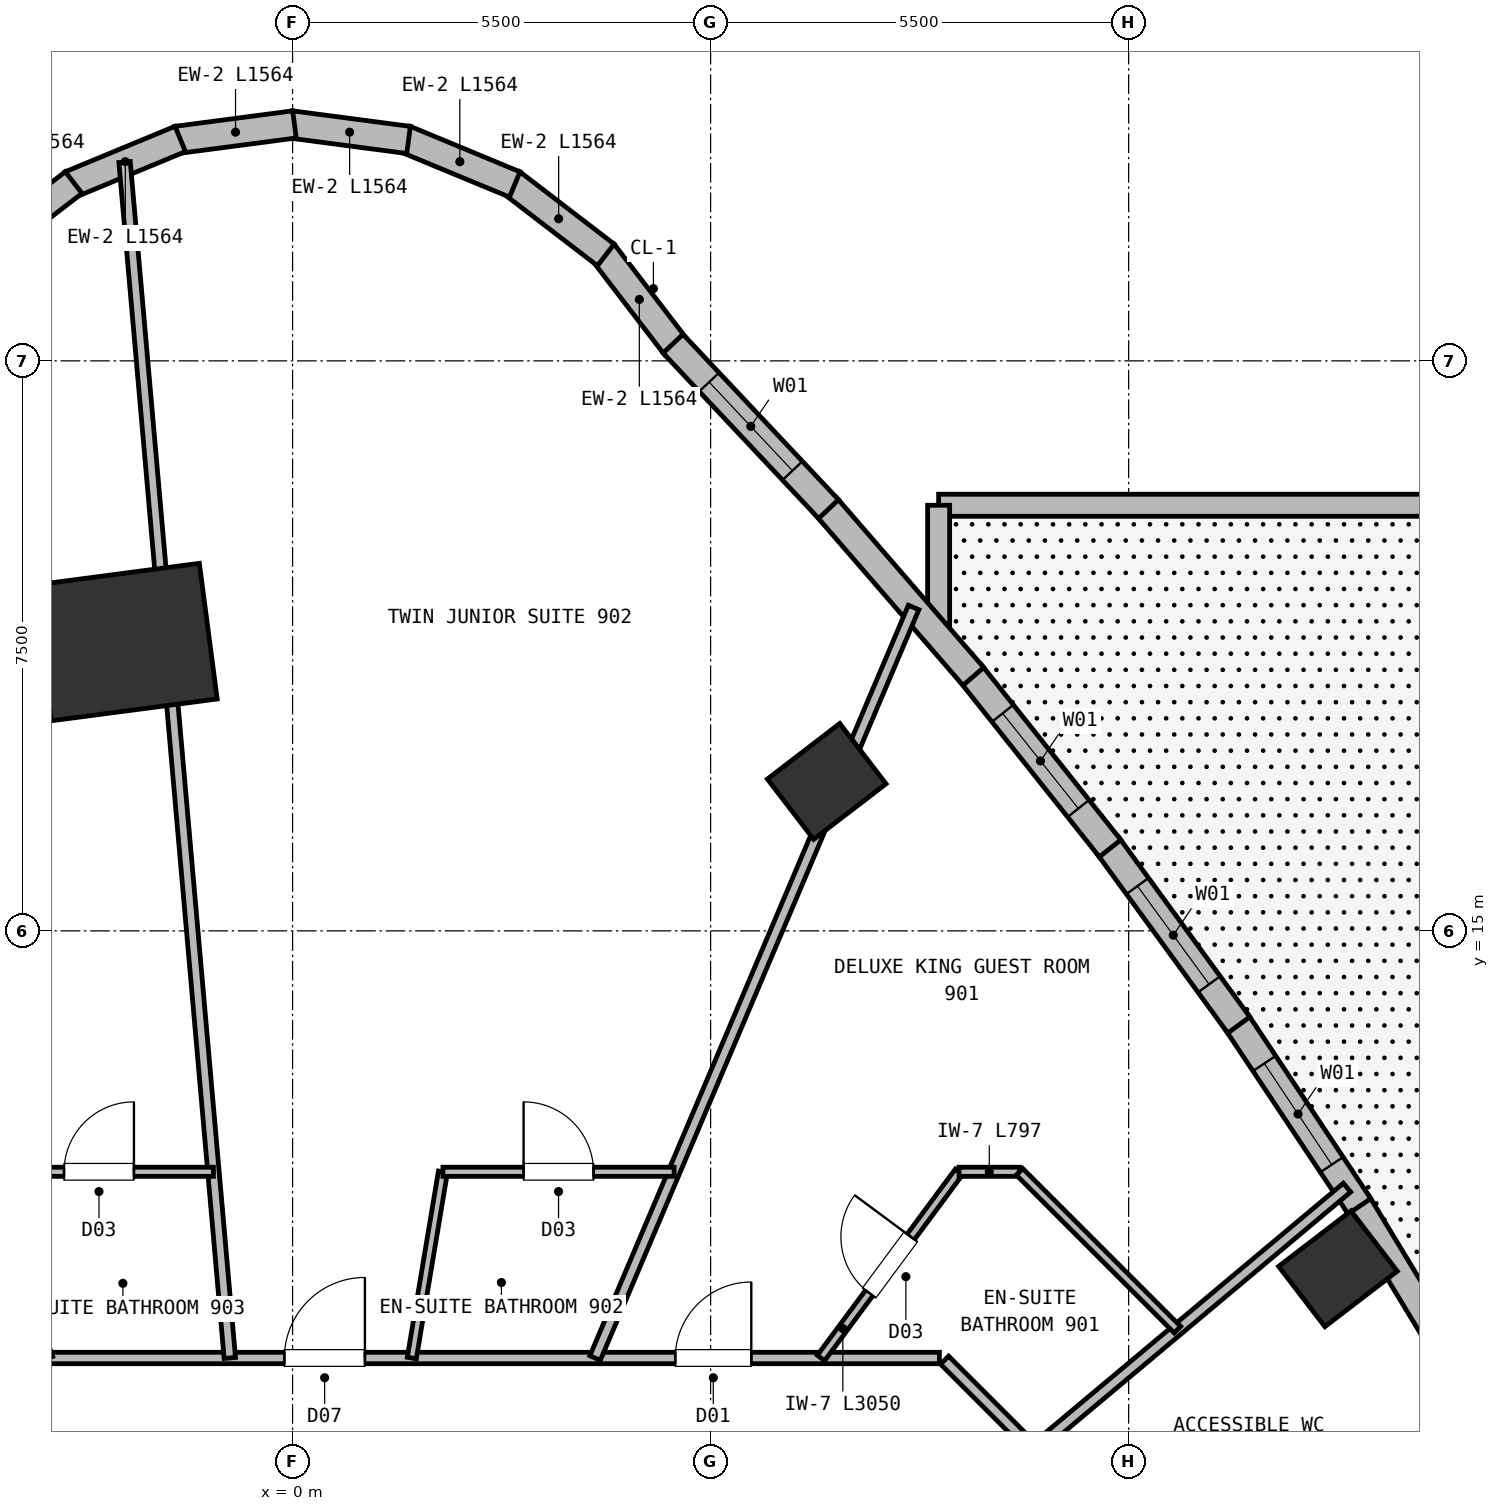
"""IFC4 building model, lengths in metres.
Left out: names, types, materials, properties, quantities, classifications, styles, units other than length and angle.
Written with IfcOpenShell. Run it as: python <this file> out.ifc"""

import sys

from ifc_helpers import new_model, si_unit, direction, frame, frame_2d, origin, origin_2d, place, context, subcontext, project, spatial, rectangle, extrude, element, fill, save


model = new_model("IFC4")
c1 = context("Model", 3, precision=1e-05, world=origin(), true_north=direction((0.0, 1.0)))
c2 = subcontext(c1, "Body", "Model", "MODEL_VIEW")
j1 = project(units=[si_unit("LENGTHUNIT", "METRE"), si_unit("PLANEANGLEUNIT", "RADIAN")], contexts=[c1])
p1 = place(None, origin())
s1 = spatial("IfcSite", under=j1, at=p1, CompositionType="ELEMENT")
p2 = place(p1, origin())
s2 = spatial("IfcBuilding", under=s1, at=p2, CompositionType="ELEMENT")
p3 = place(p2, frame((0.0, 0.0, 30.5)))
s3 = spatial("IfcBuildingStorey", under=s2, at=p3, CompositionType="ELEMENT", Elevation=30.5)
p4 = place(p3, frame((-2.2, 18.8, 0.0), z_axis=(0.0, 0.0, 1.0), x_axis=(-0.13052619222, 0.991444861374, 0.0)))
e1 = element("IfcColumn", 1, at=p4, inside=s3, PredefinedType="COLUMN", context=c2, shape_type="SweptSolid", body=[
    extrude(rectangle(XDim=1.8, YDim=2.2, at=origin_2d()), origin(), (0.0, 0.0, 1.0), 3.75),
])
for number, where, z_axis, x_axis in (
    (2, (13.754, 10.554, 0.0), (0.0, 0.0, 1.0), (-0.609, 0.793, 0.0)),
    (3, (7.028, 16.966, 0.0), (0.0, 0.0, 1.0), (-0.609, 0.793, 0.0)),
):
    element("IfcColumn", number, at=place(p3, frame(where, z_axis=z_axis, x_axis=x_axis)), inside=s3, PredefinedType="COLUMN", context=c2, shape_type="SweptSolid", body=[
        extrude(rectangle(XDim=1.0, YDim=1.2, at=origin_2d()), origin(), (0.0, 0.0, 1.0), 3.75),
    ])
p5 = place(p3, frame((34.5, 20.6, 0.0), z_axis=(0.0, 0.0, 1.0), x_axis=(-1.0, 0.0, 0.0)))
e4 = element("IfcWall", 4, at=p5, inside=s3, PredefinedType="PARAPET", context=c2, shape_type="SweptSolid", body=[
    extrude(rectangle(XDim=26.0, YDim=0.29, at=frame_2d((13.0, 0.0))), origin(), (0.0, 0.0, 1.0), 1.2),
])
p6 = place(p3, frame((8.5, 20.6, 0.0), z_axis=(0.0, 0.0, 1.0), x_axis=(0.0, -1.0, 0.0)))
e5 = element("IfcWall", 5, at=p6, inside=s3, PredefinedType="PARAPET", context=c2, shape_type="SweptSolid", body=[
    extrude(rectangle(XDim=1.694, YDim=0.29, at=frame_2d((0.847, 0.0))), origin(), (0.0, 0.0, 1.0), 1.2),
])
for number, where, z_axis, x_axis in (
    (6, (4.086, 23.929, 0.0), (0.0, 0.0, 1.0), (0.609, -0.793, 0.0)),
    (7, (2.88, 24.846, 0.0), (0.0, 0.0, 1.0), (0.793, -0.609, 0.0)),
    (8, (1.478, 25.42, 0.0), (0.0, 0.0, 1.0), (0.924, -0.383, 0.0)),
    (9, (-0.025, 25.611, 0.0), (0.0, 0.0, 1.0), (0.991, -0.13, 0.0)),
    (10, (-1.526, 25.407, 0.0), (0.0, 0.0, 1.0), (0.991, 0.13, 0.0)),
    (11, (-2.923, 24.821, 0.0), (0.0, 0.0, 1.0), (0.924, 0.383, 0.0)),
    (12, (-4.121, 23.894, 0.0), (0.0, 0.0, 1.0), (0.793, 0.609, 0.0)),
):
    element("IfcWall", number, at=place(p3, frame(where, z_axis=z_axis, x_axis=x_axis)), inside=s3, PredefinedType="SOLIDWALL", context=c2, shape_type="SweptSolid", body=[
        extrude(rectangle(XDim=1.564, YDim=0.36, at=frame_2d((0.782, 0.0))), origin(), (0.0, 0.0, 1.0), 3.5),
    ])
p7 = place(p3, frame((14.01, 11.419, 0.0), z_axis=(0.0, 0.0, 1.0), x_axis=(0.518463491903, -0.855099764685, 0.0)))
e13 = element("IfcWall", 13, at=p7, inside=s3, PredefinedType="SOLIDWALL", context=c2, shape_type="SweptSolid", body=[
    extrude(rectangle(XDim=2.91, YDim=0.36, at=frame_2d((1.455, 0.0))), origin(), (0.0, 0.0, 1.0), 3.5),
])
p8 = place(p3, frame((12.421, 13.802, 0.0), z_axis=(0.0, 0.0, 1.0), x_axis=(0.554410222631, -0.832243537099, 0.0)))
e14 = element("IfcWall", 14, at=p8, inside=s3, PredefinedType="SOLIDWALL", context=c2, shape_type="SweptSolid", body=[
    extrude(rectangle(XDim=2.915, YDim=0.36, at=frame_2d((1.458, 0.0))), origin(), (0.0, 0.0, 1.0), 3.5),
])
p9 = place(p8, frame((0.657, 0.0, 0.72)))
e15 = element("IfcOpeningElement", 15, at=p9, cuts=e14, PredefinedType="OPENING", context=c2, shape_type="SweptSolid", body=[
    extrude(rectangle(XDim=1.6, YDim=1.88, at=frame_2d((0.8, 0.94))), frame((0.0, 0.19, 0.0), z_axis=(0.0, -1.0, 0.0), x_axis=(1.0, 0.0, 0.0)), (0.0, 0.0, 1.0), 0.38),
])
p10 = place(p3, frame((10.726, 16.125, 0.0), z_axis=(0.0, 0.0, 1.0), x_axis=(0.589223239374, -0.807970280507, 0.0)))
e16 = element("IfcWall", 16, at=p10, inside=s3, PredefinedType="SOLIDWALL", context=c2, shape_type="SweptSolid", body=[
    extrude(rectangle(XDim=2.925, YDim=0.36, at=frame_2d((1.463, 0.0))), origin(), (0.0, 0.0, 1.0), 3.5),
])
p11 = place(p10, frame((0.663, 0.0, 0.72)))
e17 = element("IfcOpeningElement", 17, at=p11, cuts=e16, PredefinedType="OPENING", context=c2, shape_type="SweptSolid", body=[
    extrude(rectangle(XDim=1.6, YDim=1.88, at=frame_2d((0.8, 0.94))), frame((0.0, 0.19, 0.0), z_axis=(0.0, -1.0, 0.0), x_axis=(1.0, 0.0, 0.0)), (0.0, 0.0, 1.0), 0.38),
])
p12 = place(p3, frame((8.925, 18.387, 0.0), z_axis=(0.0, 0.0, 1.0), x_axis=(0.622637946995, -0.782510055502, 0.0)))
e18 = element("IfcWall", 18, at=p12, inside=s3, PredefinedType="SOLIDWALL", context=c2, shape_type="SweptSolid", body=[
    extrude(rectangle(XDim=2.941, YDim=0.36, at=frame_2d((1.471, 0.0))), origin(), (0.0, 0.0, 1.0), 3.5),
])
p13 = place(p12, frame((0.67, 0.0, 0.72)))
e19 = element("IfcOpeningElement", 19, at=p13, cuts=e18, PredefinedType="OPENING", context=c2, shape_type="SweptSolid", body=[
    extrude(rectangle(XDim=1.6, YDim=1.88, at=frame_2d((0.8, 0.94))), frame((0.0, 0.19, 0.0), z_axis=(0.0, -1.0, 0.0), x_axis=(1.0, 0.0, 0.0)), (0.0, 0.0, 1.0), 0.38),
])
p14 = place(p3, frame((7.018, 20.587, 0.0), z_axis=(0.0, 0.0, 1.0), x_axis=(0.654585220283, -0.755988220402, 0.0)))
e20 = element("IfcWall", 20, at=p14, inside=s3, PredefinedType="SOLIDWALL", context=c2, shape_type="SweptSolid", body=[
    extrude(rectangle(XDim=2.961, YDim=0.36, at=frame_2d((1.481, 0.0))), origin(), (0.0, 0.0, 1.0), 3.5),
])
p15 = place(p3, frame((5.006, 22.726, 0.0), z_axis=(0.0, 0.0, 1.0), x_axis=(0.684946458387, -0.728593404542, 0.0)))
e21 = element("IfcWall", 21, at=p15, inside=s3, PredefinedType="SOLIDWALL", context=c2, shape_type="SweptSolid", body=[
    extrude(rectangle(XDim=2.987, YDim=0.36, at=frame_2d((1.494, 0.0))), origin(), (0.0, 0.0, 1.0), 3.5),
])
p16 = place(p15, frame((0.694, 0.0, 0.72)))
e22 = element("IfcOpeningElement", 22, at=p16, cuts=e21, PredefinedType="OPENING", context=c2, shape_type="SweptSolid", body=[
    extrude(rectangle(XDim=1.6, YDim=1.88, at=frame_2d((0.8, 0.94))), frame((0.0, 0.19, 0.0), z_axis=(0.0, -1.0, 0.0), x_axis=(1.0, 0.0, 0.0)), (0.0, 0.0, 1.0), 0.38),
])
p17 = place(p3, frame((8.578, 9.352, 0.0), z_axis=(0.0, 0.0, 1.0), x_axis=(0.707067066127, -0.707146494016, 0.0)))
e23 = element("IfcWall", 23, at=p17, inside=s3, PredefinedType="PARTITIONING", context=c2, shape_type="SweptSolid", body=[
    extrude(rectangle(XDim=3.074, YDim=0.15, at=frame_2d((1.537, 0.0))), origin(), (0.0, 0.0, 1.0), 3.5),
])
p18 = place(p3, frame((-8.51, 9.38, 0.0), z_axis=(0.0, 0.0, 1.0), x_axis=(1.0, 0.0, 0.0)))
e24 = element("IfcWall", 24, at=p18, inside=s3, PredefinedType="PARTITIONING", context=c2, shape_type="SweptSolid", body=[
    extrude(rectangle(XDim=17.02, YDim=0.15, at=frame_2d((8.51, 0.0))), origin(), (0.0, 0.0, 1.0), 3.5),
])
p19 = place(p18, frame((13.545, 0.0, 0.0)))
e25 = element("IfcOpeningElement", 25, at=p19, cuts=e24, PredefinedType="OPENING", context=c2, shape_type="SweptSolid", body=[
    extrude(rectangle(XDim=1.0, YDim=2.15, at=frame_2d((0.5, 1.075))), frame((0.0, 0.085, 0.0), z_axis=(0.0, -1.0, 0.0), x_axis=(1.0, 0.0, 0.0)), (0.0, 0.0, 1.0), 0.17),
])
p20 = place(p18, frame((3.095, 0.0, 0.0)))
e26 = element("IfcOpeningElement", 26, at=p20, cuts=e24, PredefinedType="OPENING", context=c2, shape_type="SweptSolid", body=[
    extrude(rectangle(XDim=1.06, YDim=2.15, at=frame_2d((0.53, 1.075))), frame((0.0, 0.085, 0.0), z_axis=(0.0, -1.0, 0.0), x_axis=(1.0, 0.0, 0.0)), (0.0, 0.0, 1.0), 0.17),
])
p21 = place(p18, frame((8.402, 0.0, 0.0)))
e27 = element("IfcOpeningElement", 27, at=p21, cuts=e24, PredefinedType="OPENING", context=c2, shape_type="SweptSolid", body=[
    extrude(rectangle(XDim=1.06, YDim=2.15, at=frame_2d((0.53, 1.075))), frame((0.0, 0.085, 0.0), z_axis=(0.0, -1.0, 0.0), x_axis=(1.0, 0.0, 0.0)), (0.0, 0.0, 1.0), 0.17),
])
p22 = place(p3, frame((9.756, 8.174, 0.0), z_axis=(0.0, 0.0, 1.0), x_axis=(0.766556770399, 0.642176547186, 0.0)))
e28 = element("IfcWall", 28, at=p22, inside=s3, PredefinedType="PARTITIONING", context=c2, shape_type="SweptSolid", body=[
    extrude(rectangle(XDim=5.37, YDim=0.15, at=frame_2d((2.685, 0.0))), origin(), (0.0, 0.0, 1.0), 3.5),
])
p23 = place(p3, frame((6.952, 9.38, 0.0), z_axis=(0.0, 0.0, 1.0), x_axis=(0.595378789074, 0.80344514282, 0.0)))
e29 = element("IfcWall", 29, at=p23, inside=s3, PredefinedType="PARTITIONING", context=c2, shape_type="SweptSolid", body=[
    extrude(rectangle(XDim=3.05, YDim=0.12, at=frame_2d((1.525, 0.0))), origin(), (0.0, 0.0, 1.0), 3.5),
])
p24 = place(p23, frame((1.065, 0.0, 0.0)))
e30 = element("IfcOpeningElement", 30, at=p24, cuts=e29, PredefinedType="OPENING", context=c2, shape_type="SweptSolid", body=[
    extrude(rectangle(XDim=0.92, YDim=2.1, at=frame_2d((0.46, 1.05))), frame((0.0, 0.07, 0.0), z_axis=(0.0, -1.0, 0.0), x_axis=(1.0, 0.0, 0.0)), (0.0, 0.0, 1.0), 0.14),
])
p25 = place(p3, frame((8.768, 11.83, 0.0), z_axis=(0.0, 0.0, 1.0), x_axis=(1.0, 0.0, 0.0)))
e31 = element("IfcWall", 31, at=p25, inside=s3, PredefinedType="PARTITIONING", context=c2, shape_type="SweptSolid", body=[
    extrude(rectangle(XDim=0.797, YDim=0.12, at=frame_2d((0.398, 0.0))), origin(), (0.0, 0.0, 1.0), 3.5),
])
p26 = place(p3, frame((9.565, 11.83, 0.0), z_axis=(0.0, 0.0, 1.0), x_axis=(0.707106781187, -0.707106781187, 0.0)))
e32 = element("IfcWall", 32, at=p26, inside=s3, PredefinedType="PARTITIONING", context=c2, shape_type="SweptSolid", body=[
    extrude(rectangle(XDim=2.938, YDim=0.12, at=frame_2d((1.469, 0.0))), origin(), (0.0, 0.0, 1.0), 3.5),
])
p27 = place(p3, frame((3.98, 9.38, 0.0), z_axis=(0.0, 0.0, 1.0), x_axis=(0.390626405148, 0.920549298843, 0.0)))
e33 = element("IfcWall", 33, at=p27, inside=s3, PredefinedType="PARTITIONING", context=c2, shape_type="SweptSolid", body=[
    extrude(rectangle(XDim=10.728, YDim=0.15, at=frame_2d((5.364, 0.0))), origin(), (0.0, 0.0, 1.0), 3.5),
])
p28 = place(p3, frame((1.569, 9.38, 0.0), z_axis=(0.0, 0.0, 1.0), x_axis=(0.165004545821, 0.98629280635, 0.0)))
e34 = element("IfcWall", 34, at=p28, inside=s3, PredefinedType="PARTITIONING", context=c2, shape_type="SweptSolid", body=[
    extrude(rectangle(XDim=2.484, YDim=0.12, at=frame_2d((1.242, 0.0))), origin(), (0.0, 0.0, 1.0), 3.5),
])
p29 = place(p3, frame((1.979, 11.83, 0.0), z_axis=(0.0, 0.0, 1.0), x_axis=(1.0, 0.0, 0.0)))
e35 = element("IfcWall", 35, at=p29, inside=s3, PredefinedType="PARTITIONING", context=c2, shape_type="SweptSolid", body=[
    extrude(rectangle(XDim=3.042, YDim=0.12, at=frame_2d((1.521, 0.0))), origin(), (0.0, 0.0, 1.0), 3.5),
])
p30 = place(p29, frame((1.061, 0.0, 0.0)))
e36 = element("IfcOpeningElement", 36, at=p30, cuts=e35, PredefinedType="OPENING", context=c2, shape_type="SweptSolid", body=[
    extrude(rectangle(XDim=0.92, YDim=2.1, at=frame_2d((0.46, 1.05))), frame((0.0, 0.07, 0.0), z_axis=(0.0, -1.0, 0.0), x_axis=(1.0, 0.0, 0.0)), (0.0, 0.0, 1.0), 0.14),
])
p31 = place(p3, frame((-0.826, 9.38, 0.0), z_axis=(0.0, 0.0, 1.0), x_axis=(-0.087674603254, 0.996149167517, 0.0)))
e37 = element("IfcWall", 37, at=p31, inside=s3, PredefinedType="PARTITIONING", context=c2, shape_type="SweptSolid", body=[
    extrude(rectangle(XDim=15.797, YDim=0.15, at=frame_2d((7.898, 0.0))), origin(), (0.0, 0.0, 1.0), 3.5),
])
p32 = place(p3, frame((-4.053, 11.83, 0.0), z_axis=(0.0, 0.0, 1.0), x_axis=(0.324078497959, -0.946030193578, 0.0)))
e38 = element("IfcWall", 38, at=p32, inside=s3, PredefinedType="PARTITIONING", context=c2, shape_type="SweptSolid", body=[
    extrude(rectangle(XDim=2.59, YDim=0.12, at=frame_2d((1.295, 0.0))), origin(), (0.0, 0.0, 1.0), 3.5),
])
p33 = place(p3, frame((-4.053, 11.83, 0.0), z_axis=(0.0, 0.0, 1.0), x_axis=(1.0, 0.0, 0.0)))
e39 = element("IfcWall", 39, at=p33, inside=s3, PredefinedType="PARTITIONING", context=c2, shape_type="SweptSolid", body=[
    extrude(rectangle(XDim=3.012, YDim=0.12, at=frame_2d((1.506, 0.0))), origin(), (0.0, 0.0, 1.0), 3.5),
])
p34 = place(p33, frame((1.046, 0.0, 0.0)))
e40 = element("IfcOpeningElement", 40, at=p34, cuts=e39, PredefinedType="OPENING", context=c2, shape_type="SweptSolid", body=[
    extrude(rectangle(XDim=0.92, YDim=2.1, at=frame_2d((0.46, 1.05))), frame((0.0, 0.07, 0.0), z_axis=(0.0, -1.0, 0.0), x_axis=(1.0, 0.0, 0.0)), (0.0, 0.0, 1.0), 0.14),
])
p35 = place(p9, origin())
e41 = element("IfcWindow", 41, at=p35, inside=s3, PartitioningType="SINGLE_PANEL", PredefinedType="WINDOW", context=c2, shape_type="SweptSolid", body=[
    extrude(rectangle(XDim=1.6, YDim=1.88, at=frame_2d((0.8, 0.94))), frame((0.0, 0.03, 0.0), z_axis=(0.0, -1.0, 0.0), x_axis=(1.0, 0.0, 0.0)), (0.0, 0.0, 1.0), 0.06),
])
fill(e15, e41)
p36 = place(p11, origin())
e42 = element("IfcWindow", 42, at=p36, inside=s3, PartitioningType="SINGLE_PANEL", PredefinedType="WINDOW", context=c2, shape_type="SweptSolid", body=[
    extrude(rectangle(XDim=1.6, YDim=1.88, at=frame_2d((0.8, 0.94))), frame((0.0, 0.03, 0.0), z_axis=(0.0, -1.0, 0.0), x_axis=(1.0, 0.0, 0.0)), (0.0, 0.0, 1.0), 0.06),
])
fill(e17, e42)
p37 = place(p13, origin())
e43 = element("IfcWindow", 43, at=p37, inside=s3, PartitioningType="SINGLE_PANEL", PredefinedType="WINDOW", context=c2, shape_type="SweptSolid", body=[
    extrude(rectangle(XDim=1.6, YDim=1.88, at=frame_2d((0.8, 0.94))), frame((0.0, 0.03, 0.0), z_axis=(0.0, -1.0, 0.0), x_axis=(1.0, 0.0, 0.0)), (0.0, 0.0, 1.0), 0.06),
])
fill(e19, e43)
p38 = place(p16, origin())
e44 = element("IfcWindow", 44, at=p38, inside=s3, PartitioningType="SINGLE_PANEL", PredefinedType="WINDOW", context=c2, shape_type="SweptSolid", body=[
    extrude(rectangle(XDim=1.6, YDim=1.88, at=frame_2d((0.8, 0.94))), frame((0.0, 0.03, 0.0), z_axis=(0.0, -1.0, 0.0), x_axis=(1.0, 0.0, 0.0)), (0.0, 0.0, 1.0), 0.06),
])
fill(e22, e44)
p39 = place(p24, origin())
e45 = element("IfcDoor", 45, at=p39, inside=s3, OperationType="SINGLE_SWING_RIGHT", PredefinedType="DOOR", context=c2, shape_type="SweptSolid", body=[
    extrude(rectangle(XDim=0.92, YDim=2.1, at=frame_2d((0.46, 1.05))), frame((0.0, 0.025, 0.0), z_axis=(0.0, -1.0, 0.0), x_axis=(1.0, 0.0, 0.0)), (0.0, 0.0, 1.0), 0.05),
])
fill(e30, e45)
p40 = place(p30, origin())
e46 = element("IfcDoor", 46, at=p40, inside=s3, OperationType="SINGLE_SWING_LEFT", PredefinedType="DOOR", context=c2, shape_type="SweptSolid", body=[
    extrude(rectangle(XDim=0.92, YDim=2.1, at=frame_2d((0.46, 1.05))), frame((0.0, 0.025, 0.0), z_axis=(0.0, -1.0, 0.0), x_axis=(1.0, 0.0, 0.0)), (0.0, 0.0, 1.0), 0.05),
])
fill(e36, e46)
p41 = place(p34, origin())
e47 = element("IfcDoor", 47, at=p41, inside=s3, OperationType="SINGLE_SWING_RIGHT", PredefinedType="DOOR", context=c2, shape_type="SweptSolid", body=[
    extrude(rectangle(XDim=0.92, YDim=2.1, at=frame_2d((0.46, 1.05))), frame((0.0, 0.025, 0.0), z_axis=(0.0, -1.0, 0.0), x_axis=(1.0, 0.0, 0.0)), (0.0, 0.0, 1.0), 0.05),
])
fill(e40, e47)
p42 = place(p19, origin())
e48 = element("IfcDoor", 48, at=p42, inside=s3, OperationType="SINGLE_SWING_RIGHT", PredefinedType="DOOR", context=c2, shape_type="SweptSolid", body=[
    extrude(rectangle(XDim=1.0, YDim=2.15, at=frame_2d((0.5, 1.075))), frame((0.0, 0.025, 0.0), z_axis=(0.0, -1.0, 0.0), x_axis=(1.0, 0.0, 0.0)), (0.0, 0.0, 1.0), 0.05),
])
fill(e25, e48)
p43 = place(p21, origin())
e49 = element("IfcDoor", 49, at=p43, inside=s3, OperationType="SINGLE_SWING_RIGHT", PredefinedType="DOOR", context=c2, shape_type="SweptSolid", body=[
    extrude(rectangle(XDim=1.06, YDim=2.15, at=frame_2d((0.53, 1.075))), frame((0.0, 0.025, 0.0), z_axis=(0.0, -1.0, 0.0), x_axis=(1.0, 0.0, 0.0)), (0.0, 0.0, 1.0), 0.05),
])
fill(e27, e49)
save(model, sys.argv[1])
